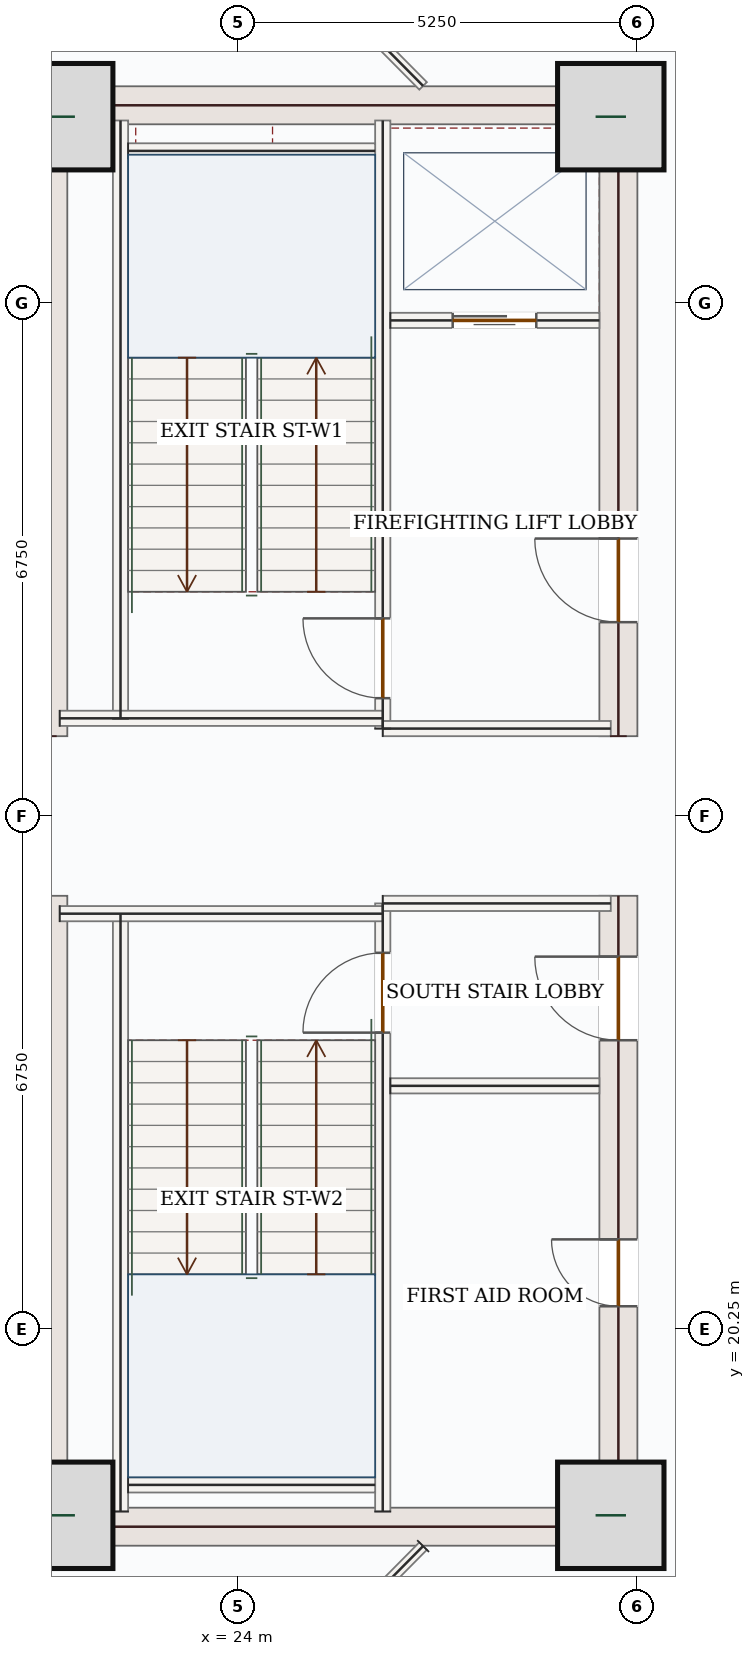
"""IFC4 building model, lengths in metres.
Left out: names, types, materials, properties, quantities, classifications, styles, units other than length and angle.
Written with IfcOpenShell. Run it as: python <this file> out.ifc"""

import sys

from ifc_helpers import new_model, si_unit, direction, frame, frame_2d, origin, origin_2d, place, context, subcontext, project, spatial, rectangle, extrude, source, transform, mapped, element, fill, save


model = new_model("IFC4")
c1 = context("Model", 3, precision=1e-05, world=origin(), true_north=direction((0.0, 1.0)))
c2 = subcontext(c1, "Body", "Model", "MODEL_VIEW")
j1 = project(units=[si_unit("LENGTHUNIT", "METRE"), si_unit("PLANEANGLEUNIT", "RADIAN")], contexts=[c1])
p1 = place(None, origin())
s1 = spatial("IfcSite", under=j1, at=p1, CompositionType="ELEMENT")
p2 = place(p1, origin())
s2 = spatial("IfcBuilding", under=s1, at=p2, CompositionType="ELEMENT")
p3 = place(p2, frame((0.0, 0.0, 33.3)))
s3 = spatial("IfcBuildingStorey", under=s2, at=p3, CompositionType="ELEMENT", Elevation=33.3)
m1 = source(origin(), c2, "Body", "SweptSolid", [
    extrude(rectangle(XDim=8.55, YDim=0.5, at=frame_2d((4.275, 0.0))), origin(), (0.0, 0.0, 1.0), 3.95),
])
for number, where, z_axis, x_axis in (
    (1, (21.5, 17.4, 0.0), (0.0, 0.0, 1.0), (0.0, 1.0, 0.0)),
    (2, (21.5, 28.05, 0.0), (0.0, 0.0, 1.0), (0.0, 1.0, 0.0)),
):
    element("IfcWall", number, at=place(p3, frame(where, z_axis=z_axis, x_axis=x_axis)), inside=s3, PredefinedType="SHEAR", context=c2, shape_type="MappedRepresentation", body=[
        mapped(m1, transform((0.0, 0.0, 0.0), x_axis=(1.0, 0.0, 0.0), y_axis=(0.0, 1.0, 0.0), z_axis=(0.0, 0.0, 1.0), scale=1.0)),
    ])
p4 = place(p3, frame((29.0, 17.4, 0.0), z_axis=(0.0, 0.0, 1.0), x_axis=(0.0, 1.0, 0.0)))
e3 = element("IfcWall", 3, at=p4, inside=s3, PredefinedType="SHEAR", context=c2, shape_type="SweptSolid", body=[
    extrude(rectangle(XDim=8.55, YDim=0.5, at=frame_2d((4.275, 0.0))), origin(), (0.0, 0.0, 1.0), 3.95),
])
p5 = place(p4, frame((6.65, 0.0, 0.0)))
e4 = element("IfcOpeningElement", 4, at=p5, cuts=e3, PredefinedType="OPENING", context=c2, shape_type="SweptSolid", body=[
    extrude(rectangle(XDim=1.1, YDim=2.2, at=frame_2d((0.55, 1.1))), frame((0.0, 0.26, 0.0), z_axis=(0.0, -1.0, 0.0), x_axis=(1.0, 0.0, 0.0)), (0.0, 0.0, 1.0), 0.52),
])
p6 = place(p4, frame((3.15, 0.0, 0.0)))
e5 = element("IfcOpeningElement", 5, at=p6, cuts=e3, PredefinedType="OPENING", context=c2, shape_type="SweptSolid", body=[
    extrude(rectangle(XDim=0.88, YDim=2.1, at=frame_2d((0.44, 1.05))), frame((0.0, 0.26, 0.0), z_axis=(0.0, -1.0, 0.0), x_axis=(1.0, 0.0, 0.0)), (0.0, 0.0, 1.0), 0.52),
])
p7 = place(p3, frame((29.0, 28.05, 0.0), z_axis=(0.0, 0.0, 1.0), x_axis=(0.0, 1.0, 0.0)))
e6 = element("IfcWall", 6, at=p7, inside=s3, PredefinedType="SHEAR", context=c2, shape_type="SweptSolid", body=[
    extrude(rectangle(XDim=8.55, YDim=0.5, at=frame_2d((4.275, 0.0))), origin(), (0.0, 0.0, 1.0), 3.95),
])
p8 = place(p7, frame((1.5, 0.0, 0.0)))
e7 = element("IfcOpeningElement", 7, at=p8, cuts=e6, PredefinedType="OPENING", context=c2, shape_type="SweptSolid", body=[
    extrude(rectangle(XDim=1.1, YDim=2.2, at=frame_2d((0.55, 1.1))), frame((0.0, 0.26, 0.0), z_axis=(0.0, -1.0, 0.0), x_axis=(1.0, 0.0, 0.0)), (0.0, 0.0, 1.0), 0.52),
])
m2 = source(origin(), c2, "Body", "SweptSolid", [
    extrude(rectangle(XDim=7.0, YDim=0.5, at=frame_2d((3.5, 0.0))), origin(), (0.0, 0.0, 1.0), 3.95),
])
for number, where, z_axis, x_axis in (
    (8, (21.75, 17.65, 0.0), (0.0, 0.0, 1.0), (1.0, 0.0, 0.0)),
    (9, (21.75, 36.35, 0.0), (0.0, 0.0, 1.0), (1.0, 0.0, 0.0)),
):
    element("IfcWall", number, at=place(p3, frame(where, z_axis=z_axis, x_axis=x_axis)), inside=s3, PredefinedType="SHEAR", context=c2, shape_type="MappedRepresentation", body=[
        mapped(m2, transform((0.0, 0.0, 0.0), x_axis=(1.0, 0.0, 0.0), y_axis=(0.0, 1.0, 0.0), z_axis=(0.0, 0.0, 1.0), scale=1.0)),
    ])
m3 = source(origin(), c2, "Body", "SweptSolid", [
    extrude(rectangle(XDim=1.4, YDim=1.4, at=origin_2d()), origin(), (0.0, 0.0, 1.0), 4.2),
])
for number, where, z_axis, x_axis in (
    (10, (21.65, 17.8, 0.0), (0.0, 0.0, 1.0), (1.0, 0.0, 0.0)),
    (11, (28.9, 17.8, 0.0), (0.0, 0.0, 1.0), (1.0, 0.0, 0.0)),
    (12, (21.65, 36.2, 0.0), (0.0, 0.0, 1.0), (1.0, 0.0, 0.0)),
    (13, (28.9, 36.2, 0.0), (0.0, 0.0, 1.0), (1.0, 0.0, 0.0)),
):
    element("IfcColumn", number, at=place(p3, frame(where, z_axis=z_axis, x_axis=x_axis)), inside=s3, PredefinedType="COLUMN", context=c2, shape_type="MappedRepresentation", body=[
        mapped(m3, transform((0.0, 0.0, 0.0), x_axis=(1.0, 0.0, 0.0), y_axis=(0.0, 1.0, 0.0), z_axis=(0.0, 0.0, 1.0), scale=1.0)),
    ])
p9 = place(p3, frame((22.658, 14.74, 0.0), z_axis=(0.0, 0.0, 1.0), x_axis=(-0.707106781187, 0.707106781187, 0.0)))
e14 = element("IfcWall", 14, at=p9, inside=s3, PredefinedType="SOLIDWALL", context=c2, shape_type="SweptSolid", body=[
    extrude(rectangle(XDim=5.258, YDim=0.32, at=frame_2d((2.629, 0.0))), origin(), (0.0, 0.0, 1.0), 3.95),
])
p10 = place(p9, frame((1.429, 0.0, 0.85)))
e15 = element("IfcOpeningElement", 15, at=p10, cuts=e14, PredefinedType="OPENING", context=c2, shape_type="SweptSolid", body=[
    extrude(rectangle(XDim=2.4, YDim=1.8, at=frame_2d((1.2, 0.9))), frame((0.0, 0.17, 0.0), z_axis=(0.0, -1.0, 0.0), x_axis=(1.0, 0.0, 0.0)), (0.0, 0.0, 1.0), 0.34),
])
m4 = source(origin(), c2, "Body", "SweptSolid", [
    extrude(rectangle(XDim=5.258, YDim=0.32, at=frame_2d((2.629, 0.0))), origin(), (0.0, 0.0, 1.0), 3.95),
])
p11 = place(p3, frame((18.94, 35.542, 0.0), z_axis=(0.0, 0.0, 1.0), x_axis=(0.707106781187, 0.707106781187, 0.0)))
e16 = element("IfcWall", 16, at=p11, inside=s3, PredefinedType="SOLIDWALL", context=c2, shape_type="MappedRepresentation", body=[
    mapped(m4, transform((0.0, 0.0, 0.0), x_axis=(1.0, 0.0, 0.0), y_axis=(0.0, 1.0, 0.0), z_axis=(0.0, 0.0, 1.0), scale=1.0)),
])
m5 = source(origin(), c2, "Body", "SweptSolid", [
    extrude(rectangle(XDim=7.87, YDim=0.2, at=frame_2d((3.935, 0.0))), origin(), (0.0, 0.0, 1.0), 3.95),
])
for number, where, z_axis, x_axis in (
    (17, (22.45, 17.85, 0.0), (0.0, 0.0, 1.0), (0.0, 1.0, 0.0)),
    (18, (22.45, 28.28, 0.0), (0.0, 0.0, 1.0), (0.0, 1.0, 0.0)),
):
    element("IfcWall", number, at=place(p3, frame(where, z_axis=z_axis, x_axis=x_axis)), inside=s3, PredefinedType="SOLIDWALL", context=c2, shape_type="MappedRepresentation", body=[
        mapped(m5, transform((0.0, 0.0, 0.0), x_axis=(1.0, 0.0, 0.0), y_axis=(0.0, 1.0, 0.0), z_axis=(0.0, 0.0, 1.0), scale=1.0)),
    ])
p12 = place(p3, frame((25.9, 17.85, 0.0), z_axis=(0.0, 0.0, 1.0), x_axis=(0.0, 1.0, 0.0)))
e19 = element("IfcWall", 19, at=p12, inside=s3, PredefinedType="SOLIDWALL", context=c2, shape_type="SweptSolid", body=[
    extrude(rectangle(XDim=8.0, YDim=0.2, at=frame_2d((4.0, 0.0))), origin(), (0.0, 0.0, 1.0), 3.95),
])
p13 = place(p12, frame((6.3, 0.0, 0.0)))
e20 = element("IfcOpeningElement", 20, at=p13, cuts=e19, PredefinedType="OPENING", context=c2, shape_type="SweptSolid", body=[
    extrude(rectangle(XDim=1.05, YDim=2.15, at=frame_2d((0.525, 1.075))), frame((0.0, 0.11, 0.0), z_axis=(0.0, -1.0, 0.0), x_axis=(1.0, 0.0, 0.0)), (0.0, 0.0, 1.0), 0.22),
])
p14 = place(p3, frame((25.9, 28.15, 0.0), z_axis=(0.0, 0.0, 1.0), x_axis=(0.0, 1.0, 0.0)))
e21 = element("IfcWall", 21, at=p14, inside=s3, PredefinedType="SOLIDWALL", context=c2, shape_type="SweptSolid", body=[
    extrude(rectangle(XDim=8.0, YDim=0.2, at=frame_2d((4.0, 0.0))), origin(), (0.0, 0.0, 1.0), 3.95),
])
p15 = place(p14, frame((0.4, 0.0, 0.0)))
e22 = element("IfcOpeningElement", 22, at=p15, cuts=e21, PredefinedType="OPENING", context=c2, shape_type="SweptSolid", body=[
    extrude(rectangle(XDim=1.05, YDim=2.15, at=frame_2d((0.525, 1.075))), frame((0.0, 0.11, 0.0), z_axis=(0.0, -1.0, 0.0), x_axis=(1.0, 0.0, 0.0)), (0.0, 0.0, 1.0), 0.22),
])
m6 = source(origin(), c2, "Body", "SweptSolid", [
    extrude(rectangle(XDim=4.25, YDim=0.2, at=frame_2d((2.125, 0.0))), origin(), (0.0, 0.0, 1.0), 3.95),
])
p16 = place(p3, frame((21.65, 25.715, 0.0), z_axis=(0.0, 0.0, 1.0), x_axis=(1.0, 0.0, 0.0)))
e23 = element("IfcWall", 23, at=p16, inside=s3, PredefinedType="SOLIDWALL", context=c2, shape_type="MappedRepresentation", body=[
    mapped(m6, transform((0.0, 0.0, 0.0), x_axis=(1.0, 0.0, 0.0), y_axis=(0.0, 1.0, 0.0), z_axis=(0.0, 0.0, 1.0), scale=1.0)),
])
m7 = source(origin(), c2, "Body", "SweptSolid", [
    extrude(rectangle(XDim=3.0, YDim=0.2, at=frame_2d((1.5, 0.0))), origin(), (0.0, 0.0, 1.0), 3.95),
])
p17 = place(p3, frame((25.9, 25.85, 0.0), z_axis=(0.0, 0.0, 1.0), x_axis=(1.0, 0.0, 0.0)))
e24 = element("IfcWall", 24, at=p17, inside=s3, PredefinedType="SOLIDWALL", context=c2, shape_type="MappedRepresentation", body=[
    mapped(m7, transform((0.0, 0.0, 0.0), x_axis=(1.0, 0.0, 0.0), y_axis=(0.0, 1.0, 0.0), z_axis=(0.0, 0.0, 1.0), scale=1.0)),
])
p18 = place(p3, frame((21.65, 28.285, 0.0), z_axis=(0.0, 0.0, 1.0), x_axis=(1.0, 0.0, 0.0)))
e25 = element("IfcWall", 25, at=p18, inside=s3, PredefinedType="SOLIDWALL", context=c2, shape_type="MappedRepresentation", body=[
    mapped(m6, transform((0.0, 0.0, 0.0), x_axis=(1.0, 0.0, 0.0), y_axis=(0.0, 1.0, 0.0), z_axis=(0.0, 0.0, 1.0), scale=1.0)),
])
p19 = place(p3, frame((25.9, 28.15, 0.0), z_axis=(0.0, 0.0, 1.0), x_axis=(1.0, 0.0, 0.0)))
e26 = element("IfcWall", 26, at=p19, inside=s3, PredefinedType="SOLIDWALL", context=c2, shape_type="MappedRepresentation", body=[
    mapped(m7, transform((0.0, 0.0, 0.0), x_axis=(1.0, 0.0, 0.0), y_axis=(0.0, 1.0, 0.0), z_axis=(0.0, 0.0, 1.0), scale=1.0)),
])
m8 = source(origin(), c2, "Body", "SweptSolid", [
    extrude(rectangle(XDim=3.25, YDim=0.2, at=frame_2d((1.625, 0.0))), origin(), (0.0, 0.0, 1.0), 3.95),
])
for number, where, z_axis, x_axis in (
    (27, (22.55, 35.75, 0.0), (0.0, 0.0, 1.0), (1.0, 0.0, 0.0)),
    (28, (22.55, 18.2, 0.0), (0.0, 0.0, 1.0), (1.0, 0.0, 0.0)),
):
    element("IfcWall", number, at=place(p3, frame(where, z_axis=z_axis, x_axis=x_axis)), inside=s3, PredefinedType="SOLIDWALL", context=c2, shape_type="MappedRepresentation", body=[
        mapped(m8, transform((0.0, 0.0, 0.0), x_axis=(1.0, 0.0, 0.0), y_axis=(0.0, 1.0, 0.0), z_axis=(0.0, 0.0, 1.0), scale=1.0)),
    ])
p20 = place(p3, frame((26.0, 33.52, 0.0), z_axis=(0.0, 0.0, 1.0), x_axis=(1.0, 0.0, 0.0)))
e29 = element("IfcWall", 29, at=p20, inside=s3, PredefinedType="SOLIDWALL", context=c2, shape_type="SweptSolid", body=[
    extrude(rectangle(XDim=2.75, YDim=0.2, at=frame_2d((1.375, 0.0))), origin(), (0.0, 0.0, 1.0), 3.95),
])
p21 = place(p20, frame((0.82, 0.0, 0.0)))
e30 = element("IfcOpeningElement", 30, at=p21, cuts=e29, PredefinedType="OPENING", context=c2, shape_type="SweptSolid", body=[
    extrude(rectangle(XDim=1.1, YDim=2.15, at=frame_2d((0.55, 1.075))), frame((0.0, 0.11, 0.0), z_axis=(0.0, -1.0, 0.0), x_axis=(1.0, 0.0, 0.0)), (0.0, 0.0, 1.0), 0.22),
])
m9 = source(origin(), c2, "Body", "SweptSolid", [
    extrude(rectangle(XDim=2.75, YDim=0.2, at=frame_2d((1.375, 0.0))), origin(), (0.0, 0.0, 1.0), 3.95),
])
p22 = place(p3, frame((26.0, 23.45, 0.0), z_axis=(0.0, 0.0, 1.0), x_axis=(1.0, 0.0, 0.0)))
e31 = element("IfcWall", 31, at=p22, inside=s3, PredefinedType="SOLIDWALL", context=c2, shape_type="MappedRepresentation", body=[
    mapped(m9, transform((0.0, 0.0, 0.0), x_axis=(1.0, 0.0, 0.0), y_axis=(0.0, 1.0, 0.0), z_axis=(0.0, 0.0, 1.0), scale=1.0)),
])
m10 = source(origin(), c2, "Body", "SweptSolid", [
    extrude(rectangle(XDim=2.047, YDim=0.14, at=frame_2d((1.024, 0.0))), origin(), (0.0, 0.0, 1.0), 3.95),
])
p23 = place(p3, frame((24.99, 38.059, 0.0), z_axis=(0.0, 0.0, 1.0), x_axis=(0.703819772346, -0.710378580797, 0.0)))
e32 = element("IfcWall", 32, at=p23, inside=s3, PredefinedType="PARTITIONING", context=c2, shape_type="MappedRepresentation", body=[
    mapped(m10, transform((0.0, 0.0, 0.0), x_axis=(1.0, 0.0, 0.0), y_axis=(0.0, 1.0, 0.0), z_axis=(0.0, 0.0, 1.0), scale=1.0)),
])
m11 = source(origin(), c2, "Body", "SweptSolid", [
    extrude(rectangle(XDim=3.505, YDim=0.14, at=frame_2d((1.752, 0.0))), origin(), (0.0, 0.0, 1.0), 3.95),
])
p24 = place(p3, frame((26.431, 17.395, 0.0), z_axis=(0.0, 0.0, 1.0), x_axis=(-0.703790445361, -0.710407635811, 0.0)))
e33 = element("IfcWall", 33, at=p24, inside=s3, PredefinedType="PARTITIONING", context=c2, shape_type="MappedRepresentation", body=[
    mapped(m11, transform((0.0, 0.0, 0.0), x_axis=(1.0, 0.0, 0.0), y_axis=(0.0, 1.0, 0.0), z_axis=(0.0, 0.0, 1.0), scale=1.0)),
])
m12 = source(origin(), c2, "Body", "SweptSolid", [
    extrude(rectangle(XDim=2.4, YDim=1.8, at=frame_2d((1.2, 0.9))), frame((0.0, 0.03, 0.0), z_axis=(0.0, -1.0, 0.0), x_axis=(1.0, 0.0, 0.0)), (0.0, 0.0, 1.0), 0.06),
])
p25 = place(p10, origin())
e34 = element("IfcWindow", 34, at=p25, inside=s3, PartitioningType="DOUBLE_PANEL_VERTICAL", PredefinedType="WINDOW", context=c2, shape_type="MappedRepresentation", body=[
    mapped(m12, transform((0.0, 0.0, 0.0), x_axis=(1.0, 0.0, 0.0), y_axis=(0.0, 1.0, 0.0), z_axis=(0.0, 0.0, 1.0), scale=1.0)),
])
fill(e15, e34)
m13 = source(origin(), c2, "Body", "SweptSolid", [
    extrude(rectangle(XDim=1.05, YDim=2.15, at=frame_2d((0.525, 1.075))), frame((0.0, 0.025, 0.0), z_axis=(0.0, -1.0, 0.0), x_axis=(1.0, 0.0, 0.0)), (0.0, 0.0, 1.0), 0.05),
])
p26 = place(p15, origin())
e35 = element("IfcDoor", 35, at=p26, inside=s3, OperationType="SINGLE_SWING_RIGHT", PredefinedType="DOOR", context=c2, shape_type="MappedRepresentation", body=[
    mapped(m13, transform((0.0, 0.0, 0.0), x_axis=(1.0, 0.0, 0.0), y_axis=(0.0, 1.0, 0.0), z_axis=(0.0, 0.0, 1.0), scale=1.0)),
])
fill(e22, e35)
p27 = place(p13, origin())
e36 = element("IfcDoor", 36, at=p27, inside=s3, OperationType="SINGLE_SWING_LEFT", PredefinedType="DOOR", context=c2, shape_type="MappedRepresentation", body=[
    mapped(m13, transform((0.0, 0.0, 0.0), x_axis=(1.0, 0.0, 0.0), y_axis=(0.0, 1.0, 0.0), z_axis=(0.0, 0.0, 1.0), scale=1.0)),
])
fill(e20, e36)
m14 = source(origin(), c2, "Body", "SweptSolid", [
    extrude(rectangle(XDim=1.1, YDim=2.15, at=frame_2d((0.55, 1.075))), frame((0.0, 0.025, 0.0), z_axis=(0.0, -1.0, 0.0), x_axis=(1.0, 0.0, 0.0)), (0.0, 0.0, 1.0), 0.05),
])
p28 = place(p21, origin())
e37 = element("IfcDoor", 37, at=p28, inside=s3, OperationType="DOUBLE_DOOR_SLIDING", PredefinedType="DOOR", context=c2, shape_type="MappedRepresentation", body=[
    mapped(m14, transform((0.0, 0.0, 0.0), x_axis=(1.0, 0.0, 0.0), y_axis=(0.0, 1.0, 0.0), z_axis=(0.0, 0.0, 1.0), scale=1.0)),
])
fill(e30, e37)
m15 = source(origin(), c2, "Body", "SweptSolid", [
    extrude(rectangle(XDim=1.1, YDim=2.2, at=frame_2d((0.55, 1.1))), frame((0.0, 0.025, 0.0), z_axis=(0.0, -1.0, 0.0), x_axis=(1.0, 0.0, 0.0)), (0.0, 0.0, 1.0), 0.05),
])
p29 = place(p8, origin())
e38 = element("IfcDoor", 38, at=p29, inside=s3, OperationType="SINGLE_SWING_RIGHT", PredefinedType="DOOR", context=c2, shape_type="MappedRepresentation", body=[
    mapped(m15, transform((0.0, 0.0, 0.0), x_axis=(1.0, 0.0, 0.0), y_axis=(0.0, 1.0, 0.0), z_axis=(0.0, 0.0, 1.0), scale=1.0)),
])
fill(e7, e38)
p30 = place(p5, origin())
e39 = element("IfcDoor", 39, at=p30, inside=s3, OperationType="SINGLE_SWING_RIGHT", PredefinedType="DOOR", context=c2, shape_type="MappedRepresentation", body=[
    mapped(m15, transform((0.0, 0.0, 0.0), x_axis=(1.0, 0.0, 0.0), y_axis=(0.0, 1.0, 0.0), z_axis=(0.0, 0.0, 1.0), scale=1.0)),
])
fill(e4, e39)
m16 = source(origin(), c2, "Body", "SweptSolid", [
    extrude(rectangle(XDim=0.88, YDim=2.1, at=frame_2d((0.44, 1.05))), frame((0.0, 0.025, 0.0), z_axis=(0.0, -1.0, 0.0), x_axis=(1.0, 0.0, 0.0)), (0.0, 0.0, 1.0), 0.05),
])
p31 = place(p6, origin())
e40 = element("IfcDoor", 40, at=p31, inside=s3, OperationType="SINGLE_SWING_RIGHT", PredefinedType="DOOR", context=c2, shape_type="MappedRepresentation", body=[
    mapped(m16, transform((0.0, 0.0, 0.0), x_axis=(1.0, 0.0, 0.0), y_axis=(0.0, 1.0, 0.0), z_axis=(0.0, 0.0, 1.0), scale=1.0)),
])
fill(e5, e40)
save(model, sys.argv[1])
